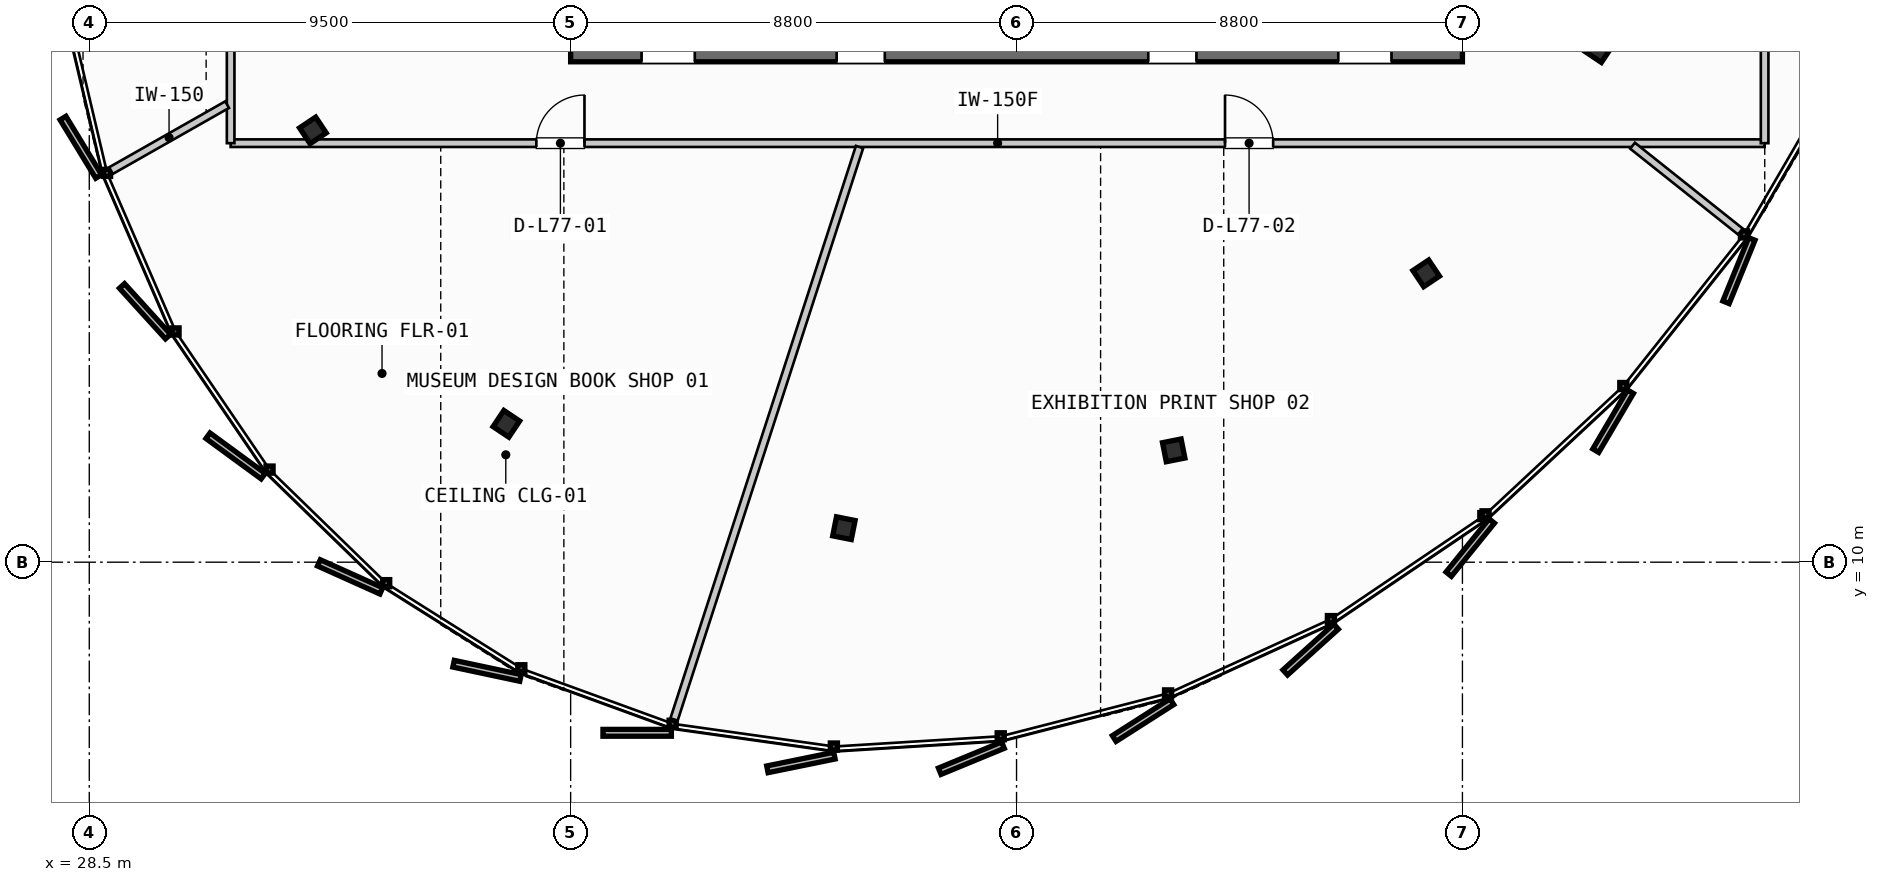
"""IFC4 building model, lengths in metres.
Left out: names, types, materials, properties, quantities, classifications, styles, units other than length and angle.
Written with IfcOpenShell. Run it as: python <this file> out.ifc"""

import sys

from ifc_helpers import new_model, si_unit, direction, frame, frame_2d, origin, origin_2d, place, context, subcontext, project, spatial, rectangle, i_section, extrude, source, transform, mapped, element, fill, save


model = new_model("IFC4")
c1 = context("Model", 3, precision=1e-05, world=origin(), true_north=direction((0.0, 1.0)))
c2 = subcontext(c1, "Body", "Model", "MODEL_VIEW")
j1 = project(units=[si_unit("LENGTHUNIT", "METRE"), si_unit("PLANEANGLEUNIT", "RADIAN")], contexts=[c1])
p1 = place(None, origin())
s1 = spatial("IfcSite", under=j1, at=p1, CompositionType="ELEMENT")
p2 = place(p1, origin())
s2 = spatial("IfcBuilding", under=s1, at=p2, CompositionType="ELEMENT")
p3 = place(p2, frame((0.0, 0.0, 290.5)))
s3 = spatial("IfcBuildingStorey", under=s2, at=p3, CompositionType="ELEMENT", Elevation=290.5)
p4 = place(p3, frame((38.0, 20.1, 0.0), z_axis=(0.0, 0.0, 1.0), x_axis=(1.0, 0.0, 0.0)))
e1 = element("IfcWall", 1, at=p4, inside=s3, PredefinedType="SHEAR", context=c2, shape_type="SweptSolid", body=[
    extrude(rectangle(XDim=17.6, YDim=0.45, at=frame_2d((8.8, 0.0))), origin(), (0.0, 0.0, 1.0), 3.21),
])
p5 = place(p4, frame((1.4, 0.0, 0.0)))
e2 = element("IfcOpeningElement", 2, at=p5, cuts=e1, PredefinedType="OPENING", context=c2, shape_type="SweptSolid", body=[
    extrude(rectangle(XDim=1.05, YDim=2.15, at=frame_2d((0.525, 1.075))), frame((0.0, 0.235, 0.0), z_axis=(0.0, -1.0, 0.0), x_axis=(1.0, 0.0, 0.0)), (0.0, 0.0, 1.0), 0.47),
])
p6 = place(p4, frame((15.15, 0.0, 0.0)))
e3 = element("IfcOpeningElement", 3, at=p6, cuts=e1, PredefinedType="OPENING", context=c2, shape_type="SweptSolid", body=[
    extrude(rectangle(XDim=1.05, YDim=2.15, at=frame_2d((0.525, 1.075))), frame((0.0, 0.235, 0.0), z_axis=(0.0, -1.0, 0.0), x_axis=(1.0, 0.0, 0.0)), (0.0, 0.0, 1.0), 0.47),
])
p7 = place(p4, frame((5.25, 0.0, 0.0)))
e4 = element("IfcOpeningElement", 4, at=p7, cuts=e1, PredefinedType="OPENING", context=c2, shape_type="SweptSolid", body=[
    extrude(rectangle(XDim=0.95, YDim=2.15, at=frame_2d((0.475, 1.075))), frame((0.0, 0.235, 0.0), z_axis=(0.0, -1.0, 0.0), x_axis=(1.0, 0.0, 0.0)), (0.0, 0.0, 1.0), 0.47),
])
p8 = place(p4, frame((11.4, 0.0, 0.0)))
e5 = element("IfcOpeningElement", 5, at=p8, cuts=e1, PredefinedType="OPENING", context=c2, shape_type="SweptSolid", body=[
    extrude(rectangle(XDim=0.95, YDim=2.15, at=frame_2d((0.475, 1.075))), frame((0.0, 0.235, 0.0), z_axis=(0.0, -1.0, 0.0), x_axis=(1.0, 0.0, 0.0)), (0.0, 0.0, 1.0), 0.47),
])
m1 = source(origin(), c2, "Body", "SweptSolid", [
    extrude(i_section(OverallWidth=0.374, OverallDepth=0.383, WebThickness=0.017, FlangeThickness=0.026, FilletRadius=0.015, at=origin_2d()), origin(), (0.0, 0.0, 1.0), 3.21),
])
for number, where, z_axis, x_axis in (
    (6, (32.913, 18.521, 0.0), (0.0, 0.0, 1.0), (-0.831, -0.556, 0.0)),
    (7, (36.731, 12.731, 0.0), (0.0, 0.0, 1.0), (-0.556, -0.831, 0.0)),
    (8, (43.393, 10.671, 0.0), (0.0, 0.0, 1.0), (-0.195, -0.981, 0.0)),
    (9, (49.902, 12.207, 0.0), (0.0, 0.0, 1.0), (0.195, -0.981, 0.0)),
    (10, (54.885, 15.7, 0.0), (0.0, 0.0, 1.0), (0.556, -0.831, 0.0)),
    (11, (58.287, 20.125, 0.0), (0.0, 0.0, 1.0), (0.831, -0.556, 0.0)),
):
    element("IfcColumn", number, at=place(p3, frame(where, z_axis=z_axis, x_axis=x_axis)), inside=s3, PredefinedType="COLUMN", context=c2, shape_type="MappedRepresentation", body=[
        mapped(m1, transform((0.0, 0.0, 0.0), scale=1.0)),
    ])
p9 = place(p3, frame((31.29, 18.269, 0.0), z_axis=(0.0, 0.0, 1.0), x_axis=(1.0, 0.0, 0.0)))
e12 = element("IfcWall", 12, at=p9, inside=s3, PredefinedType="PARTITIONING", context=c2, shape_type="SweptSolid", body=[
    extrude(rectangle(XDim=30.274, YDim=0.15, at=frame_2d((15.137, 0.0))), origin(), (0.0, 0.0, 1.0), 2.315),
])
p10 = place(p9, frame((6.033, 0.0, 0.0)))
e13 = element("IfcOpeningElement", 13, at=p10, cuts=e12, PredefinedType="OPENING", context=c2, shape_type="SweptSolid", body=[
    extrude(rectangle(XDim=0.95, YDim=2.15, at=frame_2d((0.475, 1.075))), frame((0.0, 0.085, 0.0), z_axis=(0.0, -1.0, 0.0), x_axis=(1.0, 0.0, 0.0)), (0.0, 0.0, 1.0), 0.17),
])
p11 = place(p9, frame((19.625, 0.0, 0.0)))
e14 = element("IfcOpeningElement", 14, at=p11, cuts=e12, PredefinedType="OPENING", context=c2, shape_type="SweptSolid", body=[
    extrude(rectangle(XDim=0.95, YDim=2.15, at=frame_2d((0.475, 1.075))), frame((0.0, 0.085, 0.0), z_axis=(0.0, -1.0, 0.0), x_axis=(1.0, 0.0, 0.0)), (0.0, 0.0, 1.0), 0.17),
])
p12 = place(p3, frame((61.564, 18.269, 0.0), z_axis=(0.0, 0.0, 1.0), x_axis=(0.0, 1.0, 0.0)))
e15 = element("IfcWall", 15, at=p12, inside=s3, PredefinedType="PARTITIONING", context=c2, shape_type="SweptSolid", body=[
    extrude(rectangle(XDim=19.293, YDim=0.15, at=frame_2d((9.646, 0.0))), origin(), (0.0, 0.0, 1.0), 2.315),
])
p13 = place(p12, frame((4.312, 0.0, 0.0)))
e16 = element("IfcOpeningElement", 16, at=p13, cuts=e15, PredefinedType="OPENING", context=c2, shape_type="SweptSolid", body=[
    extrude(rectangle(XDim=0.95, YDim=2.15, at=frame_2d((0.475, 1.075))), frame((0.0, 0.085, 0.0), z_axis=(0.0, -1.0, 0.0), x_axis=(1.0, 0.0, 0.0)), (0.0, 0.0, 1.0), 0.17),
])
p14 = place(p12, frame((9.858, 0.0, 0.0)))
e17 = element("IfcOpeningElement", 17, at=p14, cuts=e15, PredefinedType="OPENING", context=c2, shape_type="SweptSolid", body=[
    extrude(rectangle(XDim=0.95, YDim=2.15, at=frame_2d((0.475, 1.075))), frame((0.0, 0.085, 0.0), z_axis=(0.0, -1.0, 0.0), x_axis=(1.0, 0.0, 0.0)), (0.0, 0.0, 1.0), 0.17),
])
p15 = place(p12, frame((15.95, 0.0, 0.0)))
e18 = element("IfcOpeningElement", 18, at=p15, cuts=e15, PredefinedType="OPENING", context=c2, shape_type="SweptSolid", body=[
    extrude(rectangle(XDim=0.95, YDim=2.15, at=frame_2d((0.475, 1.075))), frame((0.0, 0.085, 0.0), z_axis=(0.0, -1.0, 0.0), x_axis=(1.0, 0.0, 0.0)), (0.0, 0.0, 1.0), 0.17),
])
p16 = place(p3, frame((31.29, 37.562, 0.0), z_axis=(0.0, 0.0, 1.0), x_axis=(0.0, -1.0, 0.0)))
e19 = element("IfcWall", 19, at=p16, inside=s3, PredefinedType="PARTITIONING", context=c2, shape_type="SweptSolid", body=[
    extrude(rectangle(XDim=19.293, YDim=0.15, at=frame_2d((9.646, 0.0))), origin(), (0.0, 0.0, 1.0), 2.315),
])
p17 = place(p16, frame((4.403, 0.0, 0.0)))
e20 = element("IfcOpeningElement", 20, at=p17, cuts=e19, PredefinedType="OPENING", context=c2, shape_type="SweptSolid", body=[
    extrude(rectangle(XDim=0.95, YDim=2.15, at=frame_2d((0.475, 1.075))), frame((0.0, 0.085, 0.0), z_axis=(0.0, -1.0, 0.0), x_axis=(1.0, 0.0, 0.0)), (0.0, 0.0, 1.0), 0.17),
])
p18 = place(p16, frame((14.181, 0.0, 0.0)))
e21 = element("IfcOpeningElement", 21, at=p18, cuts=e19, PredefinedType="OPENING", context=c2, shape_type="SweptSolid", body=[
    extrude(rectangle(XDim=0.95, YDim=2.15, at=frame_2d((0.475, 1.075))), frame((0.0, 0.085, 0.0), z_axis=(0.0, -1.0, 0.0), x_axis=(1.0, 0.0, 0.0)), (0.0, 0.0, 1.0), 0.17),
])
p19 = place(p3, frame((31.22, 19.029, 0.0), z_axis=(0.0, 0.0, 1.0), x_axis=(-0.869579502261, -0.493792961925, 0.0)))
e22 = element("IfcWall", 22, at=p19, inside=s3, PredefinedType="PARTITIONING", context=c2, shape_type="SweptSolid", body=[
    extrude(rectangle(XDim=2.636, YDim=0.15, at=frame_2d((1.318, 0.0))), origin(), (0.0, 0.0, 1.0), 2.315),
])
p20 = place(p3, frame((43.701, 18.193, 0.0), z_axis=(0.0, 0.0, 1.0), x_axis=(-0.308284462529, -0.951294218506, 0.0)))
e23 = element("IfcWall", 23, at=p20, inside=s3, PredefinedType="PARTITIONING", context=c2, shape_type="SweptSolid", body=[
    extrude(rectangle(XDim=11.874, YDim=0.15, at=frame_2d((5.937, 0.0))), origin(), (0.0, 0.0, 1.0), 2.315),
])
p21 = place(p3, frame((58.958, 18.219, 0.0), z_axis=(0.0, 0.0, 1.0), x_axis=(0.782416187556, -0.622755898767, 0.0)))
e24 = element("IfcWall", 24, at=p21, inside=s3, PredefinedType="PARTITIONING", context=c2, shape_type="SweptSolid", body=[
    extrude(rectangle(XDim=2.72, YDim=0.15, at=frame_2d((1.36, 0.0))), origin(), (0.0, 0.0, 1.0), 2.315),
])
m2 = source(origin(), c2, "Body", "SweptSolid", [
    extrude(rectangle(XDim=0.95, YDim=2.15, at=frame_2d((0.475, 1.075))), frame((0.0, 0.025, 0.0), z_axis=(0.0, -1.0, 0.0), x_axis=(1.0, 0.0, 0.0)), (0.0, 0.0, 1.0), 0.05),
])
p22 = place(p10, origin())
e25 = element("IfcDoor", 25, at=p22, inside=s3, OperationType="SINGLE_SWING_RIGHT", PredefinedType="DOOR", context=c2, shape_type="MappedRepresentation", body=[
    mapped(m2, transform((0.0, 0.0, 0.0), scale=1.0)),
])
fill(e13, e25)
p23 = place(p11, origin())
e26 = element("IfcDoor", 26, at=p23, inside=s3, OperationType="SINGLE_SWING_LEFT", PredefinedType="DOOR", context=c2, shape_type="MappedRepresentation", body=[
    mapped(m2, transform((0.0, 0.0, 0.0), scale=1.0)),
])
fill(e14, e26)
save(model, sys.argv[1])
